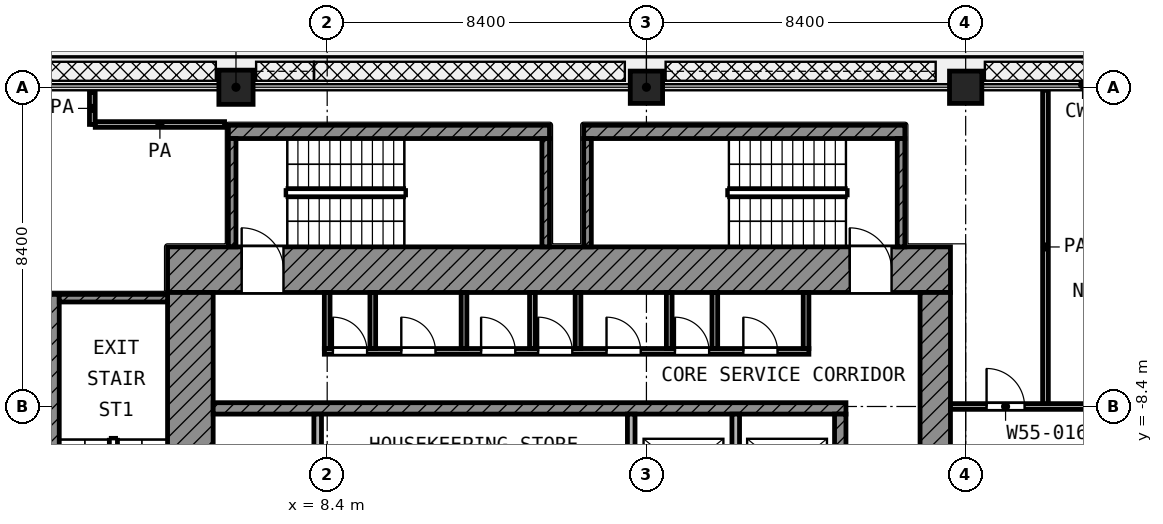
"""IFC4 building model, lengths in metres.
Left out: names, types, materials, properties, quantities, classifications, styles, units other than length and angle.
Written with IfcOpenShell. Run it as: python <this file> out.ifc"""

import sys

from ifc_helpers import new_model, si_unit, direction, frame, frame_2d, origin, origin_2d, place, context, subcontext, project, spatial, rectangle, extrude, element, fill, save


model = new_model("IFC4")
c1 = context("Model", 3, precision=1e-05, world=origin(), true_north=direction((0.0, 1.0)))
c2 = subcontext(c1, "Body", "Model", "MODEL_VIEW")
j1 = project(units=[si_unit("LENGTHUNIT", "METRE"), si_unit("PLANEANGLEUNIT", "RADIAN")], contexts=[c1])
p1 = place(None, origin())
s1 = spatial("IfcSite", under=j1, at=p1, CompositionType="ELEMENT")
p2 = place(p1, origin())
s2 = spatial("IfcBuilding", under=s1, at=p2, CompositionType="ELEMENT")
p3 = place(p2, frame((0.0, 0.0, 260.0)))
s3 = spatial("IfcBuildingStorey", under=s2, at=p3, CompositionType="ELEMENT", Elevation=260.0)
p4 = place(p3, frame((6.0, 0.0, 0.0), z_axis=(0.0, 0.0, 1.0), x_axis=(1.0, 0.0, 0.0)))
e1 = element("IfcColumn", 1, at=p4, inside=s3, PredefinedType="COLUMN", context=c2, shape_type="SweptSolid", body=[
    extrude(rectangle(XDim=0.9, YDim=0.9, at=origin_2d()), origin(), (0.0, 0.0, 1.0), 4.2),
])
for number, where, z_axis, x_axis in (
    (2, (16.8, 0.0, 0.0), (0.0, 0.0, 1.0), (1.0, 0.0, 0.0)),
    (3, (25.2, 0.0, 0.0), (0.0, 0.0, 1.0), (1.0, 0.0, 0.0)),
):
    element("IfcColumn", number, at=place(p3, frame(where, z_axis=z_axis, x_axis=x_axis)), inside=s3, PredefinedType="COLUMN", context=c2, shape_type="SweptSolid", body=[
        extrude(rectangle(XDim=0.85, YDim=0.85, at=origin_2d()), origin(), (0.0, 0.0, 1.0), 4.2),
    ])
p5 = place(p3, frame((4.2, -4.8, 0.0), z_axis=(0.0, 0.0, 1.0), x_axis=(1.0, 0.0, 0.0)))
e4 = element("IfcWall", 4, at=p5, inside=s3, PredefinedType="SHEAR", context=c2, shape_type="SweptSolid", body=[
    extrude(rectangle(XDim=20.6, YDim=1.2, at=frame_2d((10.3, 0.0))), origin(), (0.0, 0.0, 1.0), 3.6),
])
p6 = place(p5, frame((1.95, 0.0, 0.0)))
e5 = element("IfcOpeningElement", 5, at=p6, cuts=e4, PredefinedType="OPENING", context=c2, shape_type="SweptSolid", body=[
    extrude(rectangle(XDim=1.1, YDim=2.1, at=frame_2d((0.55, 1.05))), frame((0.0, 0.61, 0.0), z_axis=(0.0, -1.0, 0.0), x_axis=(1.0, 0.0, 0.0)), (0.0, 0.0, 1.0), 1.22),
])
p7 = place(p5, frame((17.95, 0.0, 0.0)))
e6 = element("IfcOpeningElement", 6, at=p7, cuts=e4, PredefinedType="OPENING", context=c2, shape_type="SweptSolid", body=[
    extrude(rectangle(XDim=1.1, YDim=2.1, at=frame_2d((0.55, 1.05))), frame((0.0, 0.61, 0.0), z_axis=(0.0, -1.0, 0.0), x_axis=(1.0, 0.0, 0.0)), (0.0, 0.0, 1.0), 1.22),
])
p8 = place(p3, frame((4.8, -24.8, 0.0), z_axis=(0.0, 0.0, 1.0), x_axis=(0.0, 1.0, 0.0)))
e7 = element("IfcWall", 7, at=p8, inside=s3, PredefinedType="SHEAR", context=c2, shape_type="SweptSolid", body=[
    extrude(rectangle(XDim=19.4, YDim=1.2, at=frame_2d((9.7, 0.0))), origin(), (0.0, 0.0, 1.0), 3.6),
])
p9 = place(p8, frame((11.25, 0.0, 0.0)))
e8 = element("IfcOpeningElement", 8, at=p9, cuts=e7, PredefinedType="OPENING", context=c2, shape_type="SweptSolid", body=[
    extrude(rectangle(XDim=1.1, YDim=2.1, at=frame_2d((0.55, 1.05))), frame((0.0, 0.61, 0.0), z_axis=(0.0, -1.0, 0.0), x_axis=(1.0, 0.0, 0.0)), (0.0, 0.0, 1.0), 1.22),
])
p10 = place(p8, frame((1.95, 0.0, 0.0)))
e9 = element("IfcOpeningElement", 9, at=p10, cuts=e7, PredefinedType="OPENING", context=c2, shape_type="SweptSolid", body=[
    extrude(rectangle(XDim=1.1, YDim=2.1, at=frame_2d((0.55, 1.05))), frame((0.0, 0.61, 0.0), z_axis=(0.0, -1.0, 0.0), x_axis=(1.0, 0.0, 0.0)), (0.0, 0.0, 1.0), 1.22),
])
p11 = place(p3, frame((24.4, -24.0, 0.0), z_axis=(0.0, 0.0, 1.0), x_axis=(0.0, 1.0, 0.0)))
e10 = element("IfcWall", 10, at=p11, inside=s3, PredefinedType="SHEAR", context=c2, shape_type="SweptSolid", body=[
    extrude(rectangle(XDim=18.6, YDim=0.8, at=frame_2d((9.3, 0.0))), origin(), (0.0, 0.0, 1.0), 3.6),
])
p12 = place(p11, frame((10.5, 0.0, 0.0)))
e11 = element("IfcOpeningElement", 11, at=p12, cuts=e10, PredefinedType="OPENING", context=c2, shape_type="SweptSolid", body=[
    extrude(rectangle(XDim=1.8, YDim=2.1, at=frame_2d((0.9, 1.05))), frame((0.0, 0.41, 0.0), z_axis=(0.0, -1.0, 0.0), x_axis=(1.0, 0.0, 0.0)), (0.0, 0.0, 1.0), 0.82),
])
p13 = place(p3, frame((5.4, -8.45, 0.0), z_axis=(0.0, 0.0, 1.0), x_axis=(1.0, 0.0, 0.0)))
e12 = element("IfcWall", 12, at=p13, inside=s3, PredefinedType="SHEAR", context=c2, shape_type="SweptSolid", body=[
    extrude(rectangle(XDim=16.65, YDim=0.3, at=frame_2d((8.325, 0.0))), origin(), (0.0, 0.0, 1.0), 3.6),
])
p14 = place(p3, frame((21.9, -10.95, 0.0), z_axis=(0.0, 0.0, 1.0), x_axis=(0.0, 1.0, 0.0)))
e13 = element("IfcWall", 13, at=p14, inside=s3, PredefinedType="SHEAR", context=c2, shape_type="SweptSolid", body=[
    extrude(rectangle(XDim=2.35, YDim=0.3, at=frame_2d((1.175, 0.0))), origin(), (0.0, 0.0, 1.0), 3.6),
])
for number, where, z_axis, x_axis in (
    (14, (8.15, -10.95, 0.0), (0.0, 0.0, 1.0), (0.0, 1.0, 0.0)),
    (15, (16.4, -10.95, 0.0), (0.0, 0.0, 1.0), (0.0, 1.0, 0.0)),
    (16, (19.15, -10.95, 0.0), (0.0, 0.0, 1.0), (0.0, 1.0, 0.0)),
):
    element("IfcWall", number, at=place(p3, frame(where, z_axis=z_axis, x_axis=x_axis)), inside=s3, PredefinedType="PARTITIONING", context=c2, shape_type="SweptSolid", body=[
        extrude(rectangle(XDim=2.35, YDim=0.2, at=frame_2d((1.175, 0.0))), origin(), (0.0, 0.0, 1.0), 3.6),
    ])
p15 = place(p3, frame((8.325, -6.95, 0.0), z_axis=(0.0, 0.0, 1.0), x_axis=(1.0, 0.0, 0.0)))
e17 = element("IfcWall", 17, at=p15, inside=s3, PredefinedType="PARTITIONING", context=c2, shape_type="SweptSolid", body=[
    extrude(rectangle(XDim=12.75, YDim=0.15, at=frame_2d((6.375, 0.0))), origin(), (0.0, 0.0, 1.0), 3.6),
])
p16 = place(p15, frame((0.225, 0.0, 0.0)))
e18 = element("IfcOpeningElement", 18, at=p16, cuts=e17, PredefinedType="OPENING", context=c2, shape_type="SweptSolid", body=[
    extrude(rectangle(XDim=0.9, YDim=2.1, at=frame_2d((0.45, 1.05))), frame((0.0, 0.085, 0.0), z_axis=(0.0, -1.0, 0.0), x_axis=(1.0, 0.0, 0.0)), (0.0, 0.0, 1.0), 0.17),
])
p17 = place(p15, frame((2.025, 0.0, 0.0)))
e19 = element("IfcOpeningElement", 19, at=p17, cuts=e17, PredefinedType="OPENING", context=c2, shape_type="SweptSolid", body=[
    extrude(rectangle(XDim=0.9, YDim=2.1, at=frame_2d((0.45, 1.05))), frame((0.0, 0.085, 0.0), z_axis=(0.0, -1.0, 0.0), x_axis=(1.0, 0.0, 0.0)), (0.0, 0.0, 1.0), 0.17),
])
p18 = place(p15, frame((4.125, 0.0, 0.0)))
e20 = element("IfcOpeningElement", 20, at=p18, cuts=e17, PredefinedType="OPENING", context=c2, shape_type="SweptSolid", body=[
    extrude(rectangle(XDim=0.9, YDim=2.1, at=frame_2d((0.45, 1.05))), frame((0.0, 0.085, 0.0), z_axis=(0.0, -1.0, 0.0), x_axis=(1.0, 0.0, 0.0)), (0.0, 0.0, 1.0), 0.17),
])
p19 = place(p15, frame((5.625, 0.0, 0.0)))
e21 = element("IfcOpeningElement", 21, at=p19, cuts=e17, PredefinedType="OPENING", context=c2, shape_type="SweptSolid", body=[
    extrude(rectangle(XDim=0.9, YDim=2.1, at=frame_2d((0.45, 1.05))), frame((0.0, 0.085, 0.0), z_axis=(0.0, -1.0, 0.0), x_axis=(1.0, 0.0, 0.0)), (0.0, 0.0, 1.0), 0.17),
])
p20 = place(p15, frame((7.425, 0.0, 0.0)))
e22 = element("IfcOpeningElement", 22, at=p20, cuts=e17, PredefinedType="OPENING", context=c2, shape_type="SweptSolid", body=[
    extrude(rectangle(XDim=0.9, YDim=2.1, at=frame_2d((0.45, 1.05))), frame((0.0, 0.085, 0.0), z_axis=(0.0, -1.0, 0.0), x_axis=(1.0, 0.0, 0.0)), (0.0, 0.0, 1.0), 0.17),
])
p21 = place(p15, frame((9.225, 0.0, 0.0)))
e23 = element("IfcOpeningElement", 23, at=p21, cuts=e17, PredefinedType="OPENING", context=c2, shape_type="SweptSolid", body=[
    extrude(rectangle(XDim=0.9, YDim=2.1, at=frame_2d((0.45, 1.05))), frame((0.0, 0.085, 0.0), z_axis=(0.0, -1.0, 0.0), x_axis=(1.0, 0.0, 0.0)), (0.0, 0.0, 1.0), 0.17),
])
p22 = place(p15, frame((11.025, 0.0, 0.0)))
e24 = element("IfcOpeningElement", 24, at=p22, cuts=e17, PredefinedType="OPENING", context=c2, shape_type="SweptSolid", body=[
    extrude(rectangle(XDim=0.9, YDim=2.1, at=frame_2d((0.45, 1.05))), frame((0.0, 0.085, 0.0), z_axis=(0.0, -1.0, 0.0), x_axis=(1.0, 0.0, 0.0)), (0.0, 0.0, 1.0), 0.17),
])
for number, where, z_axis, x_axis in (
    (25, (8.4, -6.875, 0.0), (0.0, 0.0, 1.0), (0.0, 1.0, 0.0)),
    (26, (9.6, -6.875, 0.0), (0.0, 0.0, 1.0), (0.0, 1.0, 0.0)),
    (27, (12.0, -6.875, 0.0), (0.0, 0.0, 1.0), (0.0, 1.0, 0.0)),
    (28, (13.8, -6.875, 0.0), (0.0, 0.0, 1.0), (0.0, 1.0, 0.0)),
    (29, (15.0, -6.875, 0.0), (0.0, 0.0, 1.0), (0.0, 1.0, 0.0)),
    (30, (17.4, -6.875, 0.0), (0.0, 0.0, 1.0), (0.0, 1.0, 0.0)),
    (31, (18.6, -6.875, 0.0), (0.0, 0.0, 1.0), (0.0, 1.0, 0.0)),
    (32, (21.0, -6.875, 0.0), (0.0, 0.0, 1.0), (0.0, 1.0, 0.0)),
):
    element("IfcWall", number, at=place(p3, frame(where, z_axis=z_axis, x_axis=x_axis)), inside=s3, PredefinedType="PARTITIONING", context=c2, shape_type="SweptSolid", body=[
        extrude(rectangle(XDim=1.475, YDim=0.15, at=frame_2d((0.738, 0.0))), origin(), (0.0, 0.0, 1.0), 3.6),
    ])
p23 = place(p3, frame((1.175, -13.9, 0.0), z_axis=(0.0, 0.0, 1.0), x_axis=(0.0, 1.0, 0.0)))
e33 = element("IfcWall", 33, at=p23, inside=s3, PredefinedType="SHEAR", context=c2, shape_type="SweptSolid", body=[
    extrude(rectangle(XDim=8.45, YDim=0.35, at=frame_2d((4.225, 0.0))), origin(), (0.0, 0.0, 1.0), 3.6),
])
p24 = place(p3, frame((1.35, -5.55, 0.0), z_axis=(0.0, 0.0, 1.0), x_axis=(1.0, 0.0, 0.0)))
e34 = element("IfcWall", 34, at=p24, inside=s3, PredefinedType="SHEAR", context=c2, shape_type="SweptSolid", body=[
    extrude(rectangle(XDim=2.85, YDim=0.2, at=frame_2d((1.425, 0.0))), origin(), (0.0, 0.0, 1.0), 3.6),
])
p25 = place(p3, frame((5.8, -1.175, 0.0), z_axis=(0.0, 0.0, 1.0), x_axis=(1.0, 0.0, 0.0)))
e35 = element("IfcWall", 35, at=p25, inside=s3, PredefinedType="SHEAR", context=c2, shape_type="SweptSolid", body=[
    extrude(rectangle(XDim=8.45, YDim=0.35, at=frame_2d((4.225, 0.0))), origin(), (0.0, 0.0, 1.0), 3.6),
])
for number, where, z_axis, x_axis in (
    (36, (5.9, -4.2, 0.0), (0.0, 0.0, 1.0), (0.0, 1.0, 0.0)),
    (37, (14.15, -4.2, 0.0), (0.0, 0.0, 1.0), (0.0, 1.0, 0.0)),
):
    element("IfcWall", number, at=place(p3, frame(where, z_axis=z_axis, x_axis=x_axis)), inside=s3, PredefinedType="SHEAR", context=c2, shape_type="SweptSolid", body=[
        extrude(rectangle(XDim=2.85, YDim=0.2, at=frame_2d((1.425, 0.0))), origin(), (0.0, 0.0, 1.0), 3.6),
    ])
p26 = place(p3, frame((15.15, -1.175, 0.0), z_axis=(0.0, 0.0, 1.0), x_axis=(1.0, 0.0, 0.0)))
e38 = element("IfcWall", 38, at=p26, inside=s3, PredefinedType="SHEAR", context=c2, shape_type="SweptSolid", body=[
    extrude(rectangle(XDim=8.45, YDim=0.35, at=frame_2d((4.225, 0.0))), origin(), (0.0, 0.0, 1.0), 3.6),
])
for number, where, z_axis, x_axis in (
    (39, (15.25, -4.2, 0.0), (0.0, 0.0, 1.0), (0.0, 1.0, 0.0)),
    (40, (23.5, -4.2, 0.0), (0.0, 0.0, 1.0), (0.0, 1.0, 0.0)),
):
    element("IfcWall", number, at=place(p3, frame(where, z_axis=z_axis, x_axis=x_axis)), inside=s3, PredefinedType="SHEAR", context=c2, shape_type="SweptSolid", body=[
        extrude(rectangle(XDim=2.85, YDim=0.2, at=frame_2d((1.425, 0.0))), origin(), (0.0, 0.0, 1.0), 3.6),
    ])
p27 = place(p3, frame((24.8, -8.4, 0.0), z_axis=(0.0, 0.0, 1.0), x_axis=(1.0, 0.0, 0.0)))
e41 = element("IfcWall", 41, at=p27, inside=s3, PredefinedType="PARTITIONING", context=c2, shape_type="SweptSolid", body=[
    extrude(rectangle(XDim=15.432, YDim=0.15, at=frame_2d((7.716, 0.0))), origin(), (0.0, 0.0, 1.0), 3.6),
])
p28 = place(p27, frame((9.3, 0.0, 0.0)))
e42 = element("IfcOpeningElement", 42, at=p28, cuts=e41, PredefinedType="OPENING", context=c2, shape_type="SweptSolid", body=[
    extrude(rectangle(XDim=1.1, YDim=2.1, at=frame_2d((0.55, 1.05))), frame((0.0, 0.085, 0.0), z_axis=(0.0, -1.0, 0.0), x_axis=(1.0, 0.0, 0.0)), (0.0, 0.0, 1.0), 0.17),
])
p29 = place(p27, frame((0.95, 0.0, 0.0)))
e43 = element("IfcOpeningElement", 43, at=p29, cuts=e41, PredefinedType="OPENING", context=c2, shape_type="SweptSolid", body=[
    extrude(rectangle(XDim=1.0, YDim=2.1, at=frame_2d((0.5, 1.05))), frame((0.0, 0.085, 0.0), z_axis=(0.0, -1.0, 0.0), x_axis=(1.0, 0.0, 0.0)), (0.0, 0.0, 1.0), 0.17),
])
p30 = place(p27, frame((5.05, 0.0, 0.0)))
e44 = element("IfcOpeningElement", 44, at=p30, cuts=e41, PredefinedType="OPENING", context=c2, shape_type="SweptSolid", body=[
    extrude(rectangle(XDim=1.2, YDim=2.1, at=frame_2d((0.6, 1.05))), frame((0.0, 0.085, 0.0), z_axis=(0.0, -1.0, 0.0), x_axis=(1.0, 0.0, 0.0)), (0.0, 0.0, 1.0), 0.17),
])
p31 = place(p3, frame((2.297, -0.98, 0.0), z_axis=(0.0, 0.0, 1.0), x_axis=(1.0, 0.0, 0.0)))
e45 = element("IfcWall", 45, at=p31, inside=s3, PredefinedType="PARTITIONING", context=c2, shape_type="SweptSolid", body=[
    extrude(rectangle(XDim=3.403, YDim=0.15, at=frame_2d((1.701, 0.0))), origin(), (0.0, 0.0, 1.0), 3.6),
])
p32 = place(p3, frame((2.22, -0.978, 0.0), z_axis=(0.0, 0.0, 1.0), x_axis=(0.0, 1.0, 0.0)))
e46 = element("IfcWall", 46, at=p32, inside=s3, PredefinedType="PARTITIONING", context=c2, shape_type="SweptSolid", body=[
    extrude(rectangle(XDim=0.843, YDim=0.15, at=frame_2d((0.421, 0.0))), origin(), (0.0, 0.0, 1.0), 3.6),
])
p33 = place(p3, frame((27.3, -8.325, 0.0), z_axis=(0.0, 0.0, 1.0), x_axis=(0.0, 1.0, 0.0)))
e47 = element("IfcWall", 47, at=p33, inside=s3, PredefinedType="PARTITIONING", context=c2, shape_type="SweptSolid", body=[
    extrude(rectangle(XDim=8.245, YDim=0.15, at=frame_2d((4.123, 0.0))), origin(), (0.0, 0.0, 1.0), 3.6),
])
p34 = place(p6, origin())
e48 = element("IfcDoor", 48, at=p34, inside=s3, OperationType="SINGLE_SWING_LEFT", PredefinedType="DOOR", context=c2, shape_type="SweptSolid", body=[
    extrude(rectangle(XDim=1.1, YDim=2.1, at=frame_2d((0.55, 1.05))), frame((0.0, 0.025, 0.0), z_axis=(0.0, -1.0, 0.0), x_axis=(1.0, 0.0, 0.0)), (0.0, 0.0, 1.0), 0.05),
])
fill(e5, e48)
p35 = place(p7, origin())
e49 = element("IfcDoor", 49, at=p35, inside=s3, OperationType="SINGLE_SWING_LEFT", PredefinedType="DOOR", context=c2, shape_type="SweptSolid", body=[
    extrude(rectangle(XDim=1.1, YDim=2.1, at=frame_2d((0.55, 1.05))), frame((0.0, 0.025, 0.0), z_axis=(0.0, -1.0, 0.0), x_axis=(1.0, 0.0, 0.0)), (0.0, 0.0, 1.0), 0.05),
])
fill(e6, e49)
p36 = place(p16, origin())
e50 = element("IfcDoor", 50, at=p36, inside=s3, OperationType="SINGLE_SWING_LEFT", PredefinedType="DOOR", context=c2, shape_type="SweptSolid", body=[
    extrude(rectangle(XDim=0.9, YDim=2.1, at=frame_2d((0.45, 1.05))), frame((0.0, 0.025, 0.0), z_axis=(0.0, -1.0, 0.0), x_axis=(1.0, 0.0, 0.0)), (0.0, 0.0, 1.0), 0.05),
])
fill(e18, e50)
p37 = place(p17, origin())
e51 = element("IfcDoor", 51, at=p37, inside=s3, OperationType="SINGLE_SWING_LEFT", PredefinedType="DOOR", context=c2, shape_type="SweptSolid", body=[
    extrude(rectangle(XDim=0.9, YDim=2.1, at=frame_2d((0.45, 1.05))), frame((0.0, 0.025, 0.0), z_axis=(0.0, -1.0, 0.0), x_axis=(1.0, 0.0, 0.0)), (0.0, 0.0, 1.0), 0.05),
])
fill(e19, e51)
p38 = place(p18, origin())
e52 = element("IfcDoor", 52, at=p38, inside=s3, OperationType="SINGLE_SWING_LEFT", PredefinedType="DOOR", context=c2, shape_type="SweptSolid", body=[
    extrude(rectangle(XDim=0.9, YDim=2.1, at=frame_2d((0.45, 1.05))), frame((0.0, 0.025, 0.0), z_axis=(0.0, -1.0, 0.0), x_axis=(1.0, 0.0, 0.0)), (0.0, 0.0, 1.0), 0.05),
])
fill(e20, e52)
p39 = place(p19, origin())
e53 = element("IfcDoor", 53, at=p39, inside=s3, OperationType="SINGLE_SWING_LEFT", PredefinedType="DOOR", context=c2, shape_type="SweptSolid", body=[
    extrude(rectangle(XDim=0.9, YDim=2.1, at=frame_2d((0.45, 1.05))), frame((0.0, 0.025, 0.0), z_axis=(0.0, -1.0, 0.0), x_axis=(1.0, 0.0, 0.0)), (0.0, 0.0, 1.0), 0.05),
])
fill(e21, e53)
p40 = place(p20, origin())
e54 = element("IfcDoor", 54, at=p40, inside=s3, OperationType="SINGLE_SWING_LEFT", PredefinedType="DOOR", context=c2, shape_type="SweptSolid", body=[
    extrude(rectangle(XDim=0.9, YDim=2.1, at=frame_2d((0.45, 1.05))), frame((0.0, 0.025, 0.0), z_axis=(0.0, -1.0, 0.0), x_axis=(1.0, 0.0, 0.0)), (0.0, 0.0, 1.0), 0.05),
])
fill(e22, e54)
p41 = place(p21, origin())
e55 = element("IfcDoor", 55, at=p41, inside=s3, OperationType="SINGLE_SWING_LEFT", PredefinedType="DOOR", context=c2, shape_type="SweptSolid", body=[
    extrude(rectangle(XDim=0.9, YDim=2.1, at=frame_2d((0.45, 1.05))), frame((0.0, 0.025, 0.0), z_axis=(0.0, -1.0, 0.0), x_axis=(1.0, 0.0, 0.0)), (0.0, 0.0, 1.0), 0.05),
])
fill(e23, e55)
p42 = place(p22, origin())
e56 = element("IfcDoor", 56, at=p42, inside=s3, OperationType="SINGLE_SWING_LEFT", PredefinedType="DOOR", context=c2, shape_type="SweptSolid", body=[
    extrude(rectangle(XDim=0.9, YDim=2.1, at=frame_2d((0.45, 1.05))), frame((0.0, 0.025, 0.0), z_axis=(0.0, -1.0, 0.0), x_axis=(1.0, 0.0, 0.0)), (0.0, 0.0, 1.0), 0.05),
])
fill(e24, e56)
p43 = place(p29, origin())
e57 = element("IfcDoor", 57, at=p43, inside=s3, OperationType="SINGLE_SWING_LEFT", PredefinedType="DOOR", context=c2, shape_type="SweptSolid", body=[
    extrude(rectangle(XDim=1.0, YDim=2.1, at=frame_2d((0.5, 1.05))), frame((0.0, 0.025, 0.0), z_axis=(0.0, -1.0, 0.0), x_axis=(1.0, 0.0, 0.0)), (0.0, 0.0, 1.0), 0.05),
])
fill(e43, e57)
save(model, sys.argv[1])
